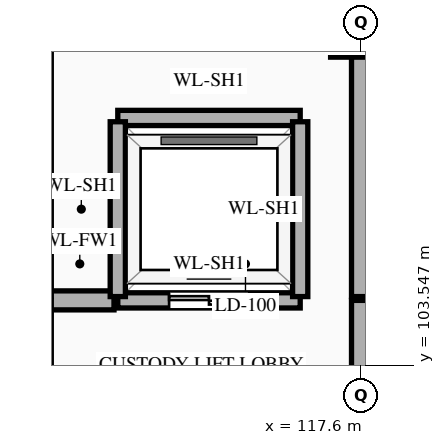
"""IFC4 building model, lengths in metres.
Left out: names, types, materials, properties, quantities, classifications, styles, units other than length and angle.
Written with IfcOpenShell. Run it as: python <this file> out.ifc"""

import sys

from ifc_helpers import new_model, si_unit, direction, frame, frame_2d, origin, origin_2d, place, context, subcontext, project, spatial, rectangle, extrude, element, fill, save


model = new_model("IFC4")
c1 = context("Model", 3, precision=1e-05, world=origin(), true_north=direction((0.0, 1.0)))
c2 = subcontext(c1, "Body", "Model", "MODEL_VIEW")
j1 = project(units=[si_unit("LENGTHUNIT", "METRE"), si_unit("PLANEANGLEUNIT", "RADIAN")], contexts=[c1])
p1 = place(None, origin())
s1 = spatial("IfcSite", under=j1, at=p1, CompositionType="ELEMENT")
p2 = place(p1, origin())
s2 = spatial("IfcBuilding", under=s1, at=p2, CompositionType="ELEMENT")
p3 = place(p2, frame((0.0, 0.0, 21.6)))
s3 = spatial("IfcBuildingStorey", under=s2, at=p3, CompositionType="ELEMENT", Elevation=21.6)
p4 = place(p3, frame((117.6, 108.0, 0.0), z_axis=(0.0, 0.0, 1.0), x_axis=(1.0, 0.0, 0.0)))
e1 = element("IfcColumn", 1, at=p4, inside=s3, PredefinedType="COLUMN", context=c2, shape_type="SweptSolid", body=[
    extrude(rectangle(XDim=0.8, YDim=0.8, at=origin_2d()), origin(), (0.0, 0.0, 1.0), 4.5),
])
p5 = place(p3, frame((113.45, 104.4, 0.0), z_axis=(0.0, 0.0, 1.0), x_axis=(1.0, 0.0, 0.0)))
e2 = element("IfcWall", 2, at=p5, inside=s3, PredefinedType="STANDARD", context=c2, shape_type="SweptSolid", body=[
    extrude(rectangle(XDim=0.9, YDim=0.25, at=frame_2d((0.45, 0.0))), origin(), (0.0, 0.0, 1.0), 4.24),
])
p6 = place(p3, frame((114.4, 104.4, 0.0), z_axis=(0.0, 0.0, 1.0), x_axis=(1.0, 0.0, 0.0)))
e3 = element("IfcWall", 3, at=p6, inside=s3, PredefinedType="STANDARD", context=c2, shape_type="SweptSolid", body=[
    extrude(rectangle(XDim=2.4, YDim=0.2, at=frame_2d((1.2, 0.0))), origin(), (0.0, 0.0, 1.0), 4.24),
])
p7 = place(p6, frame((0.675, 0.0, 0.0)))
e4 = element("IfcOpeningElement", 4, at=p7, cuts=e3, PredefinedType="OPENING", context=c2, shape_type="SweptSolid", body=[
    extrude(rectangle(XDim=1.05, YDim=2.15, at=frame_2d((0.525, 1.075))), frame((0.0, 0.112, 0.0), z_axis=(0.0, -1.0, 0.0), x_axis=(1.0, 0.0, 0.0)), (0.0, 0.0, 1.0), 0.224),
])
p8 = place(p3, frame((114.4, 106.8, 0.0), z_axis=(0.0, 0.0, 1.0), x_axis=(1.0, 0.0, 0.0)))
e5 = element("IfcWall", 5, at=p8, inside=s3, PredefinedType="STANDARD", context=c2, shape_type="SweptSolid", body=[
    extrude(rectangle(XDim=2.4, YDim=0.2, at=frame_2d((1.2, 0.0))), origin(), (0.0, 0.0, 1.0), 4.24),
])
for number, where, z_axis, x_axis in (
    (6, (114.4, 104.45, 0.0), (0.0, 0.0, 1.0), (0.0, 1.0, 0.0)),
    (7, (116.8, 104.45, 0.0), (0.0, 0.0, 1.0), (0.0, 1.0, 0.0)),
):
    element("IfcWall", number, at=place(p3, frame(where, z_axis=z_axis, x_axis=x_axis)), inside=s3, PredefinedType="STANDARD", context=c2, shape_type="SweptSolid", body=[
        extrude(rectangle(XDim=2.3, YDim=0.2, at=frame_2d((1.15, 0.0))), origin(), (0.0, 0.0, 1.0), 4.24),
    ])
p9 = place(p3, frame((117.6, 91.2, 0.0), z_axis=(0.0, 0.0, 1.0), x_axis=(0.0, 1.0, 0.0)))
e8 = element("IfcWall", 8, at=p9, inside=s3, PredefinedType="STANDARD", context=c2, shape_type="SweptSolid", body=[
    extrude(rectangle(XDim=13.2, YDim=0.25, at=frame_2d((6.6, 0.0))), origin(), (0.0, 0.0, 1.0), 3.49),
])
p10 = place(p9, frame((0.565, 0.0, 0.0)))
e9 = element("IfcOpeningElement", 9, at=p10, cuts=e8, PredefinedType="OPENING", context=c2, shape_type="SweptSolid", body=[
    extrude(rectangle(XDim=0.95, YDim=2.15, at=frame_2d((0.475, 1.075))), frame((0.0, 0.137, 0.0), z_axis=(0.0, -1.0, 0.0), x_axis=(1.0, 0.0, 0.0)), (0.0, 0.0, 1.0), 0.274),
])
p11 = place(p9, frame((10.41, 0.0, 0.0)))
e10 = element("IfcOpeningElement", 10, at=p11, cuts=e8, PredefinedType="OPENING", context=c2, shape_type="SweptSolid", body=[
    extrude(rectangle(XDim=1.1, YDim=2.2, at=frame_2d((0.55, 1.1))), frame((0.0, 0.137, 0.0), z_axis=(0.0, -1.0, 0.0), x_axis=(1.0, 0.0, 0.0)), (0.0, 0.0, 1.0), 0.274),
])
p12 = place(p9, frame((3.21, 0.0, 0.0)))
e11 = element("IfcOpeningElement", 11, at=p12, cuts=e8, PredefinedType="OPENING", context=c2, shape_type="SweptSolid", body=[
    extrude(rectangle(XDim=1.1, YDim=2.2, at=frame_2d((0.55, 1.1))), frame((0.0, 0.137, 0.0), z_axis=(0.0, -1.0, 0.0), x_axis=(1.0, 0.0, 0.0)), (0.0, 0.0, 1.0), 0.274),
])
p13 = place(p3, frame((117.6, 104.45, 0.0), z_axis=(0.0, 0.0, 1.0), x_axis=(0.0, 1.0, 0.0)))
e12 = element("IfcWall", 12, at=p13, inside=s3, PredefinedType="STANDARD", context=c2, shape_type="SweptSolid", body=[
    extrude(rectangle(XDim=3.46, YDim=0.25, at=frame_2d((1.73, 0.0))), origin(), (0.0, 0.0, 1.0), 3.49),
])
p14 = place(p7, origin())
e13 = element("IfcDoor", 13, at=p14, inside=s3, OperationType="DOUBLE_DOOR_SLIDING", PredefinedType="DOOR", context=c2, shape_type="SweptSolid", body=[
    extrude(rectangle(XDim=1.05, YDim=2.15, at=frame_2d((0.525, 1.075))), frame((0.0, 0.025, 0.0), z_axis=(0.0, -1.0, 0.0), x_axis=(1.0, 0.0, 0.0)), (0.0, 0.0, 1.0), 0.05),
])
fill(e4, e13)
save(model, sys.argv[1])
